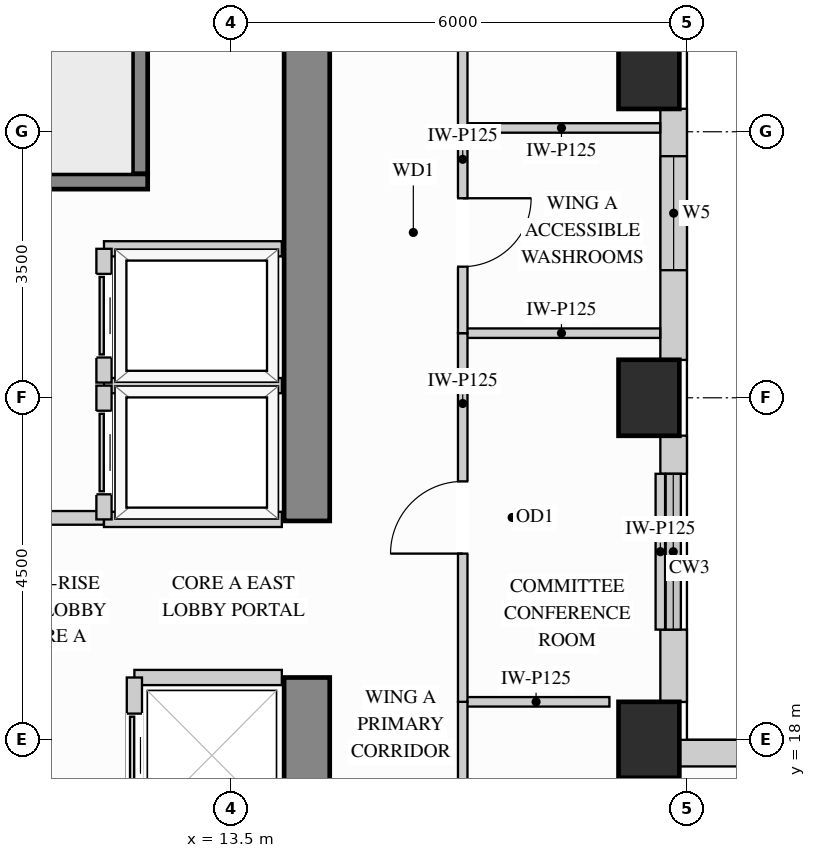
"""IFC4 building model, lengths in metres.
Left out: names, types, materials, properties, quantities, classifications, styles, units other than length and angle.
Written with IfcOpenShell. Run it as: python <this file> out.ifc"""

import sys

from ifc_helpers import new_model, si_unit, direction, frame, frame_2d, origin, origin_2d, place, context, subcontext, project, spatial, rectangle, extrude, source, transform, mapped, element, fill, save


model = new_model("IFC4")
c1 = context("Model", 3, precision=1e-05, world=origin(), true_north=direction((0.0, 1.0)))
c2 = subcontext(c1, "Body", "Model", "MODEL_VIEW")
j1 = project(units=[si_unit("LENGTHUNIT", "METRE"), si_unit("PLANEANGLEUNIT", "RADIAN")], contexts=[c1])
p1 = place(None, origin())
s1 = spatial("IfcSite", under=j1, at=p1, CompositionType="ELEMENT")
p2 = place(p1, origin())
s2 = spatial("IfcBuilding", under=s1, at=p2, CompositionType="ELEMENT")
p3 = place(p2, frame((0.0, 0.0, 153.9)))
s3 = spatial("IfcBuildingStorey", under=s2, at=p3, CompositionType="ELEMENT", Elevation=153.9)
m1 = source(origin(), c2, "Body", "SweptSolid", [
    extrude(rectangle(XDim=0.8, YDim=1.0, at=origin_2d()), origin(), (0.0, 0.0, 1.0), 3.4),
])
for number, where, z_axis, x_axis in (
    (1, (19.0, 18.0, 0.0), (0.0, 0.0, 1.0), (1.0, 0.0, 0.0)),
    (2, (19.0, 22.5, 0.0), (0.0, 0.0, 1.0), (1.0, 0.0, 0.0)),
    (3, (19.0, 26.8, 0.0), (0.0, 0.0, 1.0), (1.0, 0.0, 0.0)),
):
    element("IfcColumn", number, at=place(p3, frame(where, z_axis=z_axis, x_axis=x_axis)), inside=s3, PredefinedType="COLUMN", context=c2, shape_type="MappedRepresentation", body=[
        mapped(m1, transform((0.0, 0.0, 0.0), x_axis=(1.0, 0.0, 0.0), y_axis=(0.0, 1.0, 0.0), z_axis=(0.0, 0.0, 1.0))),
    ])
m2 = source(origin(), c2, "Body", "SweptSolid", [
    extrude(rectangle(XDim=10.02, YDim=0.6, at=frame_2d((5.01, 0.0))), origin(), (0.0, 0.0, 1.0), 3.4),
])
p4 = place(p3, frame((14.5, 8.8, 0.0), z_axis=(0.0, 0.0, 1.0), x_axis=(0.0, 1.0, 0.0)))
e4 = element("IfcWall", 4, at=p4, inside=s3, PredefinedType="SHEAR", context=c2, shape_type="MappedRepresentation", body=[
    mapped(m2, transform((0.0, 0.0, 0.0), x_axis=(1.0, 0.0, 0.0), y_axis=(0.0, 1.0, 0.0), z_axis=(0.0, 0.0, 1.0))),
])
m3 = source(origin(), c2, "Body", "SweptSolid", [
    extrude(rectangle(XDim=8.32, YDim=0.6, at=frame_2d((4.16, 0.0))), origin(), (0.0, 0.0, 1.0), 3.4),
])
p5 = place(p3, frame((14.5, 20.88, 0.0), z_axis=(0.0, 0.0, 1.0), x_axis=(0.0, 1.0, 0.0)))
e5 = element("IfcWall", 5, at=p5, inside=s3, PredefinedType="SHEAR", context=c2, shape_type="MappedRepresentation", body=[
    mapped(m3, transform((0.0, 0.0, 0.0), x_axis=(1.0, 0.0, 0.0), y_axis=(0.0, 1.0, 0.0), z_axis=(0.0, 0.0, 1.0))),
])
p6 = place(p3, frame((34.502, 17.825, 0.0), z_axis=(0.0, 0.0, 1.0), x_axis=(-1.0, 0.0, 0.0)))
e6 = element("IfcWall", 6, at=p6, inside=s3, PredefinedType="SOLIDWALL", context=c2, shape_type="SweptSolid", body=[
    extrude(rectangle(XDim=15.104, YDim=0.35, at=frame_2d((7.552, 0.0))), origin(), (0.0, 0.0, 1.0), 3.385),
])
p7 = place(p6, frame((4.131, 0.0, 0.78)))
e7 = element("IfcOpeningElement", 7, at=p7, cuts=e6, PredefinedType="OPENING", context=c2, shape_type="SweptSolid", body=[
    extrude(rectangle(XDim=1.5, YDim=2.0, at=frame_2d((0.75, 1.0))), frame((0.0, 0.185, 0.0), z_axis=(0.0, -1.0, 0.0), x_axis=(1.0, 0.0, 0.0)), (0.0, 0.0, 1.0), 0.37),
])
p8 = place(p6, frame((9.442, 0.0, 0.78)))
e8 = element("IfcOpeningElement", 8, at=p8, cuts=e6, PredefinedType="OPENING", context=c2, shape_type="SweptSolid", body=[
    extrude(rectangle(XDim=1.5, YDim=2.0, at=frame_2d((0.75, 1.0))), frame((0.0, 0.185, 0.0), z_axis=(0.0, -1.0, 0.0), x_axis=(1.0, 0.0, 0.0)), (0.0, 0.0, 1.0), 0.37),
])
m4 = source(origin(), c2, "Body", "SweptSolid", [
    extrude(rectangle(XDim=0.952, YDim=0.35, at=frame_2d((0.476, 0.0))), origin(), (0.0, 0.0, 1.0), 2.612),
])
p9 = place(p3, frame((19.325, 18.498, 0.0), z_axis=(0.0, 0.0, 1.0), x_axis=(0.0, 1.0, 0.0)))
e9 = element("IfcWall", 9, at=p9, inside=s3, PredefinedType="SOLIDWALL", context=c2, shape_type="MappedRepresentation", body=[
    mapped(m4, transform((0.0, 0.0, 0.0), x_axis=(1.0, 0.0, 0.0), y_axis=(0.0, 1.0, 0.0), z_axis=(0.0, 0.0, 1.0))),
])
m5 = source(origin(), c2, "Body", "SweptSolid", [
    extrude(rectangle(XDim=0.502, YDim=0.35, at=frame_2d((0.251, 0.0))), origin(), (0.0, 0.0, 1.0), 2.612),
])
p10 = place(p3, frame((19.325, 21.5, 0.0), z_axis=(0.0, 0.0, 1.0), x_axis=(0.0, 1.0, 0.0)))
e10 = element("IfcWall", 10, at=p10, inside=s3, PredefinedType="SOLIDWALL", context=c2, shape_type="MappedRepresentation", body=[
    mapped(m5, transform((0.0, 0.0, 0.0), x_axis=(1.0, 0.0, 0.0), y_axis=(0.0, 1.0, 0.0), z_axis=(0.0, 0.0, 1.0))),
])
p11 = place(p3, frame((19.325, 22.998, 0.0), z_axis=(0.0, 0.0, 1.0), x_axis=(0.0, 1.0, 0.0)))
e11 = element("IfcWall", 11, at=p11, inside=s3, PredefinedType="SOLIDWALL", context=c2, shape_type="SweptSolid", body=[
    extrude(rectangle(XDim=3.304, YDim=0.35, at=frame_2d((1.652, 0.0))), origin(), (0.0, 0.0, 1.0), 2.612),
])
p12 = place(p11, frame((1.18, 0.0, 0.78)))
e12 = element("IfcOpeningElement", 12, at=p12, cuts=e11, PredefinedType="OPENING", context=c2, shape_type="SweptSolid", body=[
    extrude(rectangle(XDim=1.5, YDim=1.652, at=frame_2d((0.75, 0.826))), frame((0.0, 0.185, 0.0), z_axis=(0.0, -1.0, 0.0), x_axis=(1.0, 0.0, 0.0)), (0.0, 0.0, 1.0), 0.37),
])
p13 = place(p3, frame((7.15, 20.92, 0.0), z_axis=(0.0, 0.0, 1.0), x_axis=(1.0, 0.0, 0.0)))
e13 = element("IfcWall", 13, at=p13, inside=s3, PredefinedType="PARTITIONING", context=c2, shape_type="SweptSolid", body=[
    extrude(rectangle(XDim=4.68, YDim=0.18, at=frame_2d((2.34, 0.0))), origin(), (0.0, 0.0, 1.0), 3.385),
])
p14 = place(p13, frame((2.2, 0.0, 0.0)))
e14 = element("IfcOpeningElement", 14, at=p14, cuts=e13, PredefinedType="OPENING", context=c2, shape_type="SweptSolid", body=[
    extrude(rectangle(XDim=1.1, YDim=2.15, at=frame_2d((0.55, 1.075))), frame((0.0, 0.1, 0.0), z_axis=(0.0, -1.0, 0.0), x_axis=(1.0, 0.0, 0.0)), (0.0, 0.0, 1.0), 0.2),
])
m6 = source(origin(), c2, "Body", "SweptSolid", [
    extrude(rectangle(XDim=1.93, YDim=0.125, at=frame_2d((0.965, 0.0))), origin(), (0.0, 0.0, 1.0), 3.385),
])
p15 = place(p3, frame((16.55, 18.5, 0.0), z_axis=(0.0, 0.0, 1.0), x_axis=(1.0, 0.0, 0.0)))
e15 = element("IfcWall", 15, at=p15, inside=s3, PredefinedType="PARTITIONING", context=c2, shape_type="MappedRepresentation", body=[
    mapped(m6, transform((0.0, 0.0, 0.0), x_axis=(1.0, 0.0, 0.0), y_axis=(0.0, 1.0, 0.0), z_axis=(0.0, 0.0, 1.0))),
])
m7 = source(origin(), c2, "Body", "SweptSolid", [
    extrude(rectangle(XDim=2.598, YDim=0.125, at=frame_2d((1.299, 0.0))), origin(), (0.0, 0.0, 1.0), 3.385),
])
for number, where, z_axis, x_axis in (
    (16, (16.55, 23.35, 0.0), (0.0, 0.0, 1.0), (1.0, 0.0, 0.0)),
    (17, (16.55, 26.05, 0.0), (0.0, 0.0, 1.0), (1.0, 0.0, 0.0)),
):
    element("IfcWall", number, at=place(p3, frame(where, z_axis=z_axis, x_axis=x_axis)), inside=s3, PredefinedType="PARTITIONING", context=c2, shape_type="MappedRepresentation", body=[
        mapped(m7, transform((0.0, 0.0, 0.0), x_axis=(1.0, 0.0, 0.0), y_axis=(0.0, 1.0, 0.0), z_axis=(0.0, 0.0, 1.0))),
    ])
m8 = source(origin(), c2, "Body", "SweptSolid", [
    extrude(rectangle(XDim=2.05, YDim=0.125, at=frame_2d((1.025, 0.0))), origin(), (0.0, 0.0, 1.0), 2.612),
])
p16 = place(p3, frame((19.15, 19.45, 0.0), z_axis=(0.0, 0.0, 1.0), x_axis=(0.0, 1.0, 0.0)))
e18 = element("IfcWall", 18, at=p16, inside=s3, PredefinedType="PARTITIONING", context=c2, shape_type="MappedRepresentation", body=[
    mapped(m8, transform((0.0, 0.0, 0.0), x_axis=(1.0, 0.0, 0.0), y_axis=(0.0, 1.0, 0.0), z_axis=(0.0, 0.0, 1.0))),
])
p17 = place(p3, frame((16.55, 12.35, 0.0), z_axis=(0.0, 0.0, 1.0), x_axis=(0.0, 1.0, 0.0)))
e19 = element("IfcWall", 19, at=p17, inside=s3, PredefinedType="PARTITIONING", context=c2, shape_type="SweptSolid", body=[
    extrude(rectangle(XDim=6.15, YDim=0.125, at=frame_2d((3.075, 0.0))), origin(), (0.0, 0.0, 1.0), 3.385),
])
p18 = place(p17, frame((2.6, 0.0, 0.0)))
e20 = element("IfcOpeningElement", 20, at=p18, cuts=e19, PredefinedType="OPENING", context=c2, shape_type="SweptSolid", body=[
    extrude(rectangle(XDim=0.95, YDim=2.15, at=frame_2d((0.475, 1.075))), frame((0.0, 0.073, 0.0), z_axis=(0.0, -1.0, 0.0), x_axis=(1.0, 0.0, 0.0)), (0.0, 0.0, 1.0), 0.145),
])
p19 = place(p3, frame((16.55, 18.5, 0.0), z_axis=(0.0, 0.0, 1.0), x_axis=(0.0, 1.0, 0.0)))
e21 = element("IfcWall", 21, at=p19, inside=s3, PredefinedType="PARTITIONING", context=c2, shape_type="SweptSolid", body=[
    extrude(rectangle(XDim=4.85, YDim=0.125, at=frame_2d((2.425, 0.0))), origin(), (0.0, 0.0, 1.0), 3.385),
])
p20 = place(p19, frame((1.95, 0.0, 0.0)))
e22 = element("IfcOpeningElement", 22, at=p20, cuts=e21, PredefinedType="OPENING", context=c2, shape_type="SweptSolid", body=[
    extrude(rectangle(XDim=0.95, YDim=2.15, at=frame_2d((0.475, 1.075))), frame((0.0, 0.073, 0.0), z_axis=(0.0, -1.0, 0.0), x_axis=(1.0, 0.0, 0.0)), (0.0, 0.0, 1.0), 0.145),
])
p21 = place(p3, frame((16.55, 26.05, 0.0), z_axis=(0.0, 0.0, 1.0), x_axis=(0.0, 1.0, 0.0)))
e23 = element("IfcWall", 23, at=p21, inside=s3, PredefinedType="PARTITIONING", context=c2, shape_type="SweptSolid", body=[
    extrude(rectangle(XDim=6.5, YDim=0.125, at=frame_2d((3.25, 0.0))), origin(), (0.0, 0.0, 1.0), 3.385),
])
p22 = place(p21, frame((2.775, 0.0, 0.0)))
e24 = element("IfcOpeningElement", 24, at=p22, cuts=e23, PredefinedType="OPENING", context=c2, shape_type="SweptSolid", body=[
    extrude(rectangle(XDim=0.95, YDim=2.15, at=frame_2d((0.475, 1.075))), frame((0.0, 0.073, 0.0), z_axis=(0.0, -1.0, 0.0), x_axis=(1.0, 0.0, 0.0)), (0.0, 0.0, 1.0), 0.145),
])
p23 = place(p3, frame((16.55, 23.35, 0.0), z_axis=(0.0, 0.0, 1.0), x_axis=(0.0, 1.0, 0.0)))
e25 = element("IfcWall", 25, at=p23, inside=s3, PredefinedType="PARTITIONING", context=c2, shape_type="SweptSolid", body=[
    extrude(rectangle(XDim=2.7, YDim=0.125, at=frame_2d((1.35, 0.0))), origin(), (0.0, 0.0, 1.0), 3.385),
])
p24 = place(p23, frame((0.875, 0.0, 0.0)))
e26 = element("IfcOpeningElement", 26, at=p24, cuts=e25, PredefinedType="OPENING", context=c2, shape_type="SweptSolid", body=[
    extrude(rectangle(XDim=0.9, YDim=2.15, at=frame_2d((0.45, 1.075))), frame((0.0, 0.073, 0.0), z_axis=(0.0, -1.0, 0.0), x_axis=(1.0, 0.0, 0.0)), (0.0, 0.0, 1.0), 0.145),
])
m9 = source(origin(), c2, "Body", "SweptSolid", [
    extrude(rectangle(XDim=2.34, YDim=0.2, at=frame_2d((1.17, 0.0))), origin(), (0.0, 0.0, 1.0), 3.385),
])
for number, where, z_axis, x_axis in (
    (27, (11.83, 22.66, 0.0), (0.0, 0.0, 1.0), (1.0, 0.0, 0.0)),
    (28, (11.83, 20.9, 0.0), (0.0, 0.0, 1.0), (1.0, 0.0, 0.0)),
):
    element("IfcWall", number, at=place(p3, frame(where, z_axis=z_axis, x_axis=x_axis)), inside=s3, PredefinedType="PARTITIONING", context=c2, shape_type="MappedRepresentation", body=[
        mapped(m9, transform((0.0, 0.0, 0.0), x_axis=(1.0, 0.0, 0.0), y_axis=(0.0, 1.0, 0.0), z_axis=(0.0, 0.0, 1.0))),
    ])
p25 = place(p3, frame((11.83, 20.9, 0.0), z_axis=(0.0, 0.0, 1.0), x_axis=(0.0, 1.0, 0.0)))
e29 = element("IfcWall", 29, at=p25, inside=s3, PredefinedType="PARTITIONING", context=c2, shape_type="SweptSolid", body=[
    extrude(rectangle(XDim=1.76, YDim=0.2, at=frame_2d((0.88, 0.0))), origin(), (0.0, 0.0, 1.0), 3.385),
])
p26 = place(p25, frame((0.33, 0.0, 0.0)))
e30 = element("IfcOpeningElement", 30, at=p26, cuts=e29, PredefinedType="OPENING", context=c2, shape_type="SweptSolid", body=[
    extrude(rectangle(XDim=1.1, YDim=2.2, at=frame_2d((0.55, 1.1))), frame((0.0, 0.11, 0.0), z_axis=(0.0, -1.0, 0.0), x_axis=(1.0, 0.0, 0.0)), (0.0, 0.0, 1.0), 0.22),
])
p27 = place(p3, frame((11.83, 24.46, 0.0), z_axis=(0.0, 0.0, 1.0), x_axis=(1.0, 0.0, 0.0)))
e31 = element("IfcWall", 31, at=p27, inside=s3, PredefinedType="PARTITIONING", context=c2, shape_type="MappedRepresentation", body=[
    mapped(m9, transform((0.0, 0.0, 0.0), x_axis=(1.0, 0.0, 0.0), y_axis=(0.0, 1.0, 0.0), z_axis=(0.0, 0.0, 1.0))),
])
p28 = place(p3, frame((11.83, 22.7, 0.0), z_axis=(0.0, 0.0, 1.0), x_axis=(0.0, 1.0, 0.0)))
e32 = element("IfcWall", 32, at=p28, inside=s3, PredefinedType="PARTITIONING", context=c2, shape_type="SweptSolid", body=[
    extrude(rectangle(XDim=1.76, YDim=0.2, at=frame_2d((0.88, 0.0))), origin(), (0.0, 0.0, 1.0), 3.385),
])
p29 = place(p28, frame((0.33, 0.0, 0.0)))
e33 = element("IfcOpeningElement", 33, at=p29, cuts=e32, PredefinedType="OPENING", context=c2, shape_type="SweptSolid", body=[
    extrude(rectangle(XDim=1.1, YDim=2.2, at=frame_2d((0.55, 1.1))), frame((0.0, 0.11, 0.0), z_axis=(0.0, -1.0, 0.0), x_axis=(1.0, 0.0, 0.0)), (0.0, 0.0, 1.0), 0.22),
])
m10 = source(origin(), c2, "Body", "SweptSolid", [
    extrude(rectangle(XDim=1.94, YDim=0.2, at=frame_2d((0.97, 0.0))), origin(), (0.0, 0.0, 1.0), 3.385),
])
p30 = place(p3, frame((12.23, 18.82, 0.0), z_axis=(0.0, 0.0, 1.0), x_axis=(1.0, 0.0, 0.0)))
e34 = element("IfcWall", 34, at=p30, inside=s3, PredefinedType="PARTITIONING", context=c2, shape_type="MappedRepresentation", body=[
    mapped(m10, transform((0.0, 0.0, 0.0), x_axis=(1.0, 0.0, 0.0), y_axis=(0.0, 1.0, 0.0), z_axis=(0.0, 0.0, 1.0))),
])
p31 = place(p3, frame((12.23, 16.77, 0.0), z_axis=(0.0, 0.0, 1.0), x_axis=(0.0, 1.0, 0.0)))
e35 = element("IfcWall", 35, at=p31, inside=s3, PredefinedType="PARTITIONING", context=c2, shape_type="SweptSolid", body=[
    extrude(rectangle(XDim=2.05, YDim=0.2, at=frame_2d((1.025, 0.0))), origin(), (0.0, 0.0, 1.0), 3.385),
])
p32 = place(p31, frame((0.475, 0.0, 0.0)))
e36 = element("IfcOpeningElement", 36, at=p32, cuts=e35, PredefinedType="OPENING", context=c2, shape_type="SweptSolid", body=[
    extrude(rectangle(XDim=1.1, YDim=2.2, at=frame_2d((0.55, 1.1))), frame((0.0, 0.11, 0.0), z_axis=(0.0, -1.0, 0.0), x_axis=(1.0, 0.0, 0.0)), (0.0, 0.0, 1.0), 0.22),
])
m11 = source(origin(), c2, "Body", "SweptSolid", [
    extrude(rectangle(XDim=3.753, YDim=0.2, at=frame_2d((1.876, 0.0))), origin(), (0.0, 0.0, 1.0), 3.4),
])
p33 = place(p3, frame((12.305, 25.445, 0.0), z_axis=(0.0, 0.0, 1.0), x_axis=(0.0, 1.0, 0.0)))
e37 = element("IfcWall", 37, at=p33, inside=s3, PredefinedType="SHEAR", context=c2, shape_type="MappedRepresentation", body=[
    mapped(m11, transform((0.0, 0.0, 0.0), x_axis=(1.0, 0.0, 0.0), y_axis=(0.0, 1.0, 0.0), z_axis=(0.0, 0.0, 1.0))),
])
p34 = place(p3, frame((4.802, 25.345, 0.0), z_axis=(0.0, 0.0, 1.0), x_axis=(1.0, 0.0, 0.0)))
e38 = element("IfcWall", 38, at=p34, inside=s3, PredefinedType="SHEAR", context=c2, shape_type="SweptSolid", body=[
    extrude(rectangle(XDim=7.603, YDim=0.2, at=frame_2d((3.802, 0.0))), origin(), (0.0, 0.0, 1.0), 3.4),
])
p35 = place(p34, frame((0.4, 0.0, 0.0)))
e39 = element("IfcOpeningElement", 39, at=p35, cuts=e38, PredefinedType="OPENING", context=c2, shape_type="SweptSolid", body=[
    extrude(rectangle(XDim=1.1, YDim=2.15, at=frame_2d((0.55, 1.075))), frame((0.0, 0.11, 0.0), z_axis=(0.0, -1.0, 0.0), x_axis=(1.0, 0.0, 0.0)), (0.0, 0.0, 1.0), 0.22),
])
m12 = source(origin(), c2, "Body", "SweptSolid", [
    extrude(rectangle(XDim=1.1, YDim=2.2, at=frame_2d((0.55, 1.1))), frame((0.0, 0.025, 0.0), z_axis=(0.0, -1.0, 0.0), x_axis=(1.0, 0.0, 0.0)), (0.0, 0.0, 1.0), 0.05),
])
p36 = place(p26, origin())
e40 = element("IfcDoor", 40, at=p36, inside=s3, OperationType="SLIDING_TO_LEFT", PredefinedType="DOOR", context=c2, shape_type="MappedRepresentation", body=[
    mapped(m12, transform((0.0, 0.0, 0.0), x_axis=(1.0, 0.0, 0.0), y_axis=(0.0, 1.0, 0.0), z_axis=(0.0, 0.0, 1.0))),
])
fill(e30, e40)
p37 = place(p29, origin())
e41 = element("IfcDoor", 41, at=p37, inside=s3, OperationType="SLIDING_TO_LEFT", PredefinedType="DOOR", context=c2, shape_type="MappedRepresentation", body=[
    mapped(m12, transform((0.0, 0.0, 0.0), x_axis=(1.0, 0.0, 0.0), y_axis=(0.0, 1.0, 0.0), z_axis=(0.0, 0.0, 1.0))),
])
fill(e33, e41)
p38 = place(p32, origin())
e42 = element("IfcDoor", 42, at=p38, inside=s3, OperationType="SLIDING_TO_LEFT", PredefinedType="DOOR", context=c2, shape_type="MappedRepresentation", body=[
    mapped(m12, transform((0.0, 0.0, 0.0), x_axis=(1.0, 0.0, 0.0), y_axis=(0.0, 1.0, 0.0), z_axis=(0.0, 0.0, 1.0))),
])
fill(e36, e42)
m13 = source(origin(), c2, "Body", "SweptSolid", [
    extrude(rectangle(XDim=0.95, YDim=2.15, at=frame_2d((0.475, 1.075))), frame((0.0, 0.025, 0.0), z_axis=(0.0, -1.0, 0.0), x_axis=(1.0, 0.0, 0.0)), (0.0, 0.0, 1.0), 0.05),
])
p39 = place(p20, origin())
e43 = element("IfcDoor", 43, at=p39, inside=s3, OperationType="SINGLE_SWING_LEFT", PredefinedType="DOOR", context=c2, shape_type="MappedRepresentation", body=[
    mapped(m13, transform((0.0, 0.0, 0.0), x_axis=(1.0, 0.0, 0.0), y_axis=(0.0, 1.0, 0.0), z_axis=(0.0, 0.0, 1.0))),
])
fill(e22, e43)
m14 = source(origin(), c2, "Body", "SweptSolid", [
    extrude(rectangle(XDim=0.9, YDim=2.15, at=frame_2d((0.45, 1.075))), frame((0.0, 0.025, 0.0), z_axis=(0.0, -1.0, 0.0), x_axis=(1.0, 0.0, 0.0)), (0.0, 0.0, 1.0), 0.05),
])
p40 = place(p24, origin())
e44 = element("IfcDoor", 44, at=p40, inside=s3, OperationType="SINGLE_SWING_RIGHT", PredefinedType="DOOR", context=c2, shape_type="MappedRepresentation", body=[
    mapped(m14, transform((0.0, 0.0, 0.0), x_axis=(1.0, 0.0, 0.0), y_axis=(0.0, 1.0, 0.0), z_axis=(0.0, 0.0, 1.0))),
])
fill(e26, e44)
m15 = source(origin(), c2, "Body", "SweptSolid", [
    extrude(rectangle(XDim=1.5, YDim=1.652, at=frame_2d((0.75, 0.826))), frame((0.0, 0.03, 0.0), z_axis=(0.0, -1.0, 0.0), x_axis=(1.0, 0.0, 0.0)), (0.0, 0.0, 1.0), 0.06),
])
p41 = place(p12, origin())
e45 = element("IfcWindow", 45, at=p41, inside=s3, PartitioningType="SINGLE_PANEL", PredefinedType="WINDOW", context=c2, shape_type="MappedRepresentation", body=[
    mapped(m15, transform((0.0, 0.0, 0.0), x_axis=(1.0, 0.0, 0.0), y_axis=(0.0, 1.0, 0.0), z_axis=(0.0, 0.0, 1.0))),
])
fill(e12, e45)
save(model, sys.argv[1])
